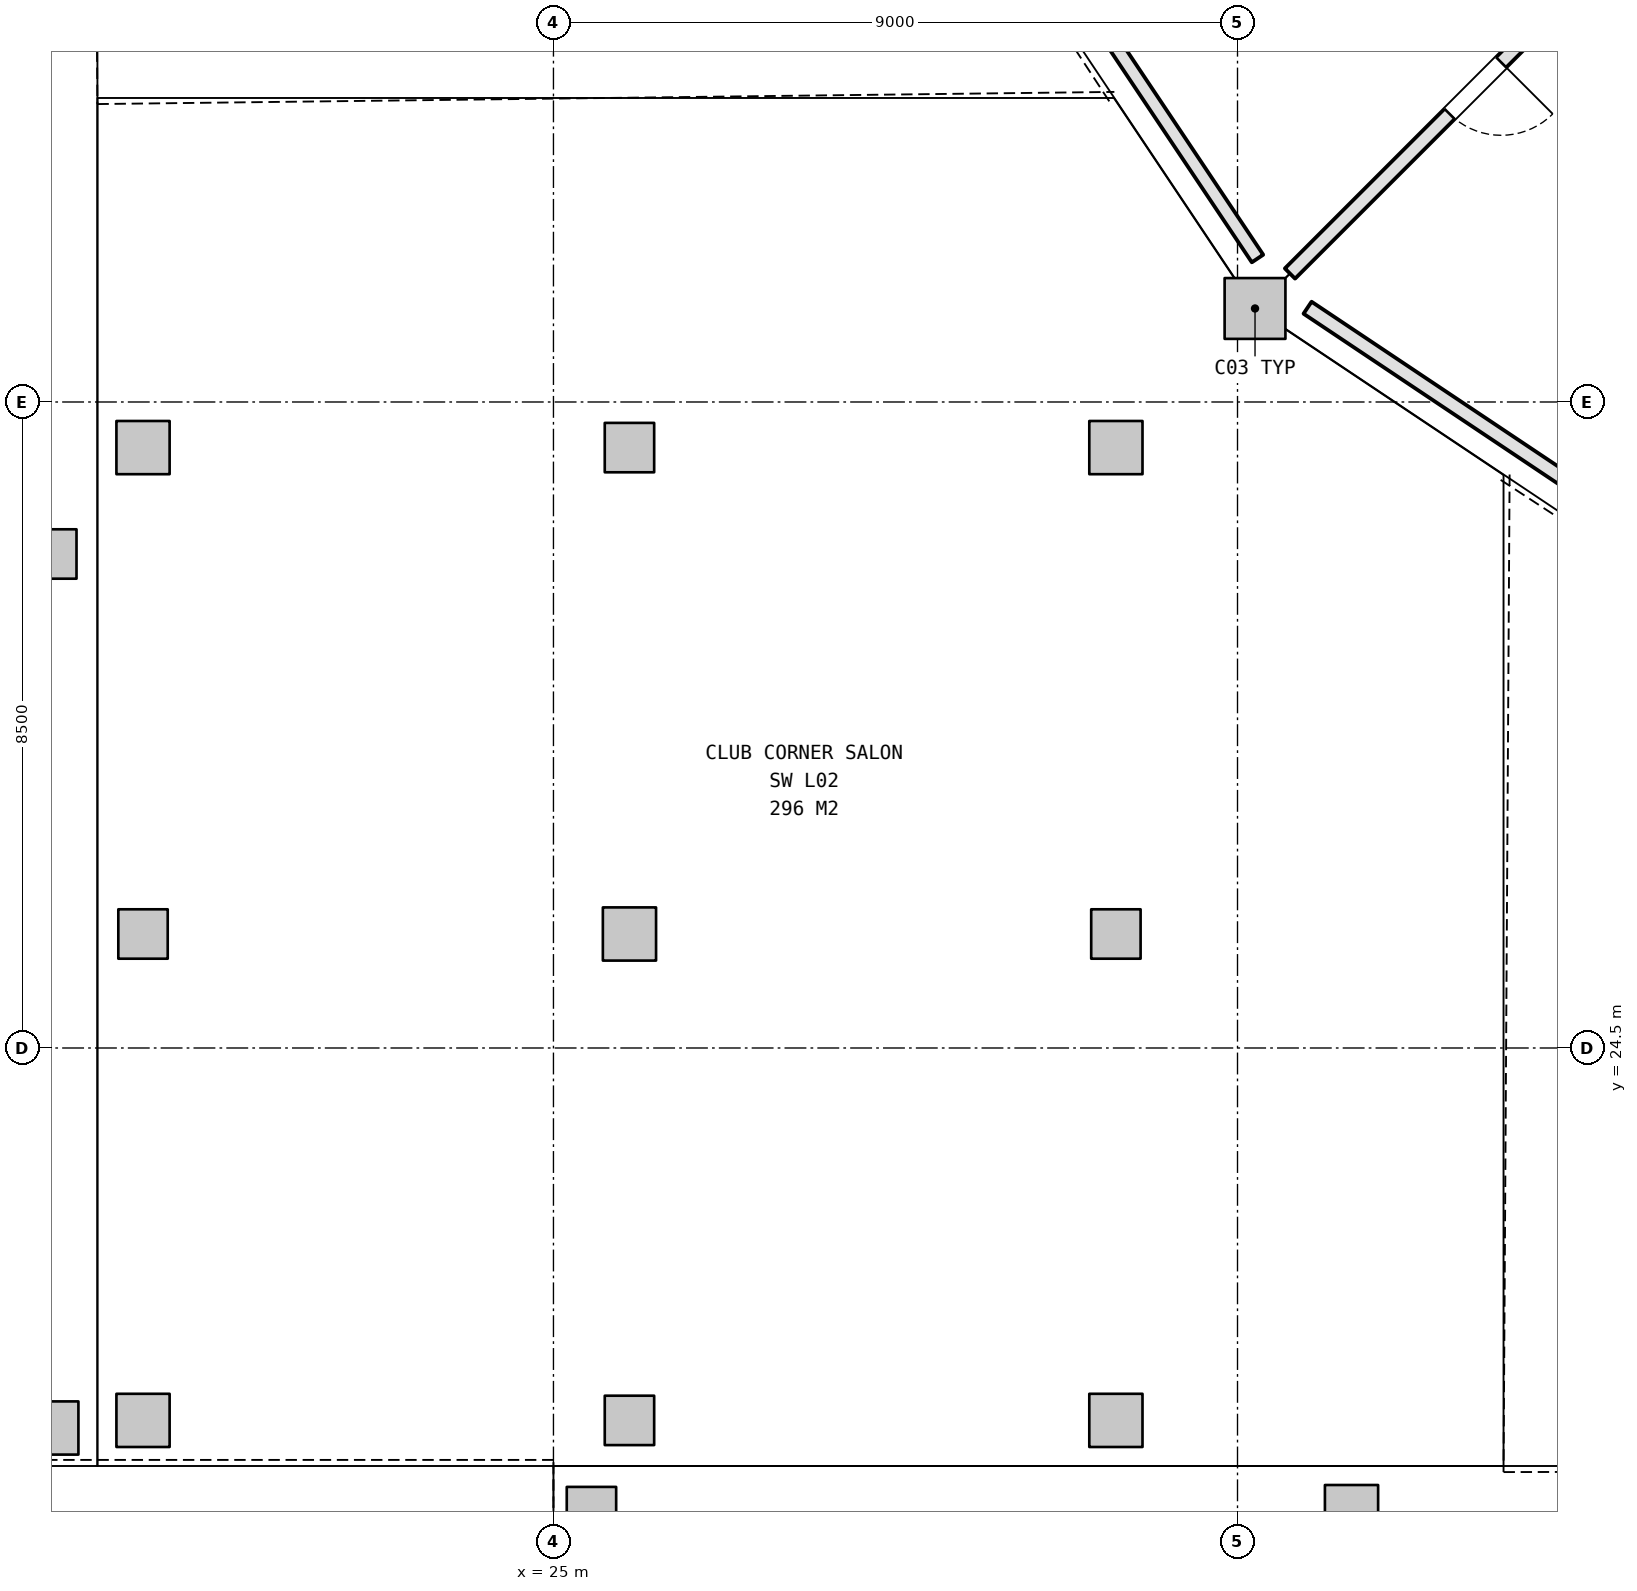
"""IFC4 building model, lengths in metres.
Left out: names, types, materials, properties, quantities, classifications, styles, units other than length and angle.
Written with IfcOpenShell. Run it as: python <this file> out.ifc"""

import sys

from ifc_helpers import new_model, si_unit, direction, frame, frame_2d, origin, origin_2d, place, context, subcontext, project, spatial, rectangle, extrude, element, fill, save


model = new_model("IFC4")
c1 = context("Model", 3, precision=1e-05, world=origin(), true_north=direction((0.0, 1.0)))
c2 = subcontext(c1, "Body", "Model", "MODEL_VIEW")
j1 = project(units=[si_unit("LENGTHUNIT", "METRE"), si_unit("PLANEANGLEUNIT", "RADIAN")], contexts=[c1])
p1 = place(None, origin())
s1 = spatial("IfcSite", under=j1, at=p1, CompositionType="ELEMENT")
p2 = place(p1, origin())
s2 = spatial("IfcBuilding", under=s1, at=p2, CompositionType="ELEMENT")
p3 = place(p2, frame((0.0, 0.0, 10.8)))
s3 = spatial("IfcBuildingStorey", under=s2, at=p3, CompositionType="ELEMENT", Elevation=10.8)
p4 = place(p3, frame((34.23, 34.23, 0.0), z_axis=(0.0, 0.0, 1.0), x_axis=(1.0, 0.0, 0.0)))
e1 = element("IfcColumn", 1, at=p4, inside=s3, PredefinedType="COLUMN", context=c2, shape_type="SweptSolid", body=[
    extrude(rectangle(XDim=0.8, YDim=0.8, at=origin_2d()), origin(), (0.0, 0.0, 1.0), 5.4),
])
p5 = place(p3, frame((18.4, 19.5, 0.0), z_axis=(0.0, 0.0, 1.0), x_axis=(1.0, 0.0, 0.0)))
e2 = element("IfcColumn", 2, at=p5, inside=s3, PredefinedType="COLUMN", context=c2, shape_type="SweptSolid", body=[
    extrude(rectangle(XDim=0.7, YDim=0.7, at=origin_2d()), origin(), (0.0, 0.0, 1.0), 5.4),
])
for number, where, z_axis, x_axis in (
    (3, (18.4, 31.0, 0.0), (0.0, 0.0, 1.0), (1.0, 0.0, 0.0)),
    (4, (25.5, 18.4, 0.0), (0.0, 0.0, 1.0), (1.0, 0.0, 0.0)),
):
    element("IfcColumn", number, at=place(p3, frame(where, z_axis=z_axis, x_axis=x_axis)), inside=s3, PredefinedType="COLUMN", context=c2, shape_type="SweptSolid", body=[
        extrude(rectangle(XDim=0.65, YDim=0.65, at=origin_2d()), origin(), (0.0, 0.0, 1.0), 5.4),
    ])
for number, where, z_axis, x_axis in (
    (5, (35.5, 18.4, 0.0), (0.0, 0.0, 1.0), (1.0, 0.0, 0.0)),
    (6, (19.6, 19.6, 0.0), (0.0, 0.0, 1.0), (1.0, 0.0, 0.0)),
):
    element("IfcColumn", number, at=place(p3, frame(where, z_axis=z_axis, x_axis=x_axis)), inside=s3, PredefinedType="COLUMN", context=c2, shape_type="SweptSolid", body=[
        extrude(rectangle(XDim=0.7, YDim=0.7, at=origin_2d()), origin(), (0.0, 0.0, 1.0), 5.4),
    ])
p6 = place(p3, frame((19.6, 26.0, 0.0), z_axis=(0.0, 0.0, 1.0), x_axis=(1.0, 0.0, 0.0)))
e7 = element("IfcColumn", 7, at=p6, inside=s3, PredefinedType="COLUMN", context=c2, shape_type="SweptSolid", body=[
    extrude(rectangle(XDim=0.65, YDim=0.65, at=origin_2d()), origin(), (0.0, 0.0, 1.0), 5.4),
])
p7 = place(p3, frame((19.6, 32.4, 0.0), z_axis=(0.0, 0.0, 1.0), x_axis=(1.0, 0.0, 0.0)))
e8 = element("IfcColumn", 8, at=p7, inside=s3, PredefinedType="COLUMN", context=c2, shape_type="SweptSolid", body=[
    extrude(rectangle(XDim=0.7, YDim=0.7, at=origin_2d()), origin(), (0.0, 0.0, 1.0), 5.4),
])
p8 = place(p3, frame((26.0, 19.6, 0.0), z_axis=(0.0, 0.0, 1.0), x_axis=(1.0, 0.0, 0.0)))
e9 = element("IfcColumn", 9, at=p8, inside=s3, PredefinedType="COLUMN", context=c2, shape_type="SweptSolid", body=[
    extrude(rectangle(XDim=0.65, YDim=0.65, at=origin_2d()), origin(), (0.0, 0.0, 1.0), 5.4),
])
p9 = place(p3, frame((26.0, 26.0, 0.0), z_axis=(0.0, 0.0, 1.0), x_axis=(1.0, 0.0, 0.0)))
e10 = element("IfcColumn", 10, at=p9, inside=s3, PredefinedType="COLUMN", context=c2, shape_type="SweptSolid", body=[
    extrude(rectangle(XDim=0.7, YDim=0.7, at=origin_2d()), origin(), (0.0, 0.0, 1.0), 5.4),
])
p10 = place(p3, frame((26.0, 32.4, 0.0), z_axis=(0.0, 0.0, 1.0), x_axis=(1.0, 0.0, 0.0)))
e11 = element("IfcColumn", 11, at=p10, inside=s3, PredefinedType="COLUMN", context=c2, shape_type="SweptSolid", body=[
    extrude(rectangle(XDim=0.65, YDim=0.65, at=origin_2d()), origin(), (0.0, 0.0, 1.0), 5.4),
])
p11 = place(p3, frame((32.4, 19.6, 0.0), z_axis=(0.0, 0.0, 1.0), x_axis=(1.0, 0.0, 0.0)))
e12 = element("IfcColumn", 12, at=p11, inside=s3, PredefinedType="COLUMN", context=c2, shape_type="SweptSolid", body=[
    extrude(rectangle(XDim=0.7, YDim=0.7, at=origin_2d()), origin(), (0.0, 0.0, 1.0), 5.4),
])
p12 = place(p3, frame((32.4, 26.0, 0.0), z_axis=(0.0, 0.0, 1.0), x_axis=(1.0, 0.0, 0.0)))
e13 = element("IfcColumn", 13, at=p12, inside=s3, PredefinedType="COLUMN", context=c2, shape_type="SweptSolid", body=[
    extrude(rectangle(XDim=0.65, YDim=0.65, at=origin_2d()), origin(), (0.0, 0.0, 1.0), 5.4),
])
p13 = place(p3, frame((32.4, 32.4, 0.0), z_axis=(0.0, 0.0, 1.0), x_axis=(1.0, 0.0, 0.0)))
e14 = element("IfcColumn", 14, at=p13, inside=s3, PredefinedType="COLUMN", context=c2, shape_type="SweptSolid", body=[
    extrude(rectangle(XDim=0.7, YDim=0.7, at=origin_2d()), origin(), (0.0, 0.0, 1.0), 5.4),
])
p14 = place(p3, frame((39.569, 39.569, 0.0), z_axis=(0.0, 0.0, 1.0), x_axis=(-0.707106781187, -0.707106781187, 0.0)))
e15 = element("IfcWall", 15, at=p14, inside=s3, PredefinedType="PARTITIONING", context=c2, shape_type="SweptSolid", body=[
    extrude(rectangle(XDim=6.9, YDim=0.19, at=frame_2d((3.45, 0.0))), origin(), (0.0, 0.0, 1.0), 4.255),
])
p15 = place(p14, frame((2.97, 0.0, 0.0)))
e16 = element("IfcOpeningElement", 16, at=p15, cuts=e15, PredefinedType="OPENING", context=c2, shape_type="SweptSolid", body=[
    extrude(rectangle(XDim=0.96, YDim=2.15, at=frame_2d((0.48, 1.075))), frame((0.0, 0.105, 0.0), z_axis=(0.0, -1.0, 0.0), x_axis=(1.0, 0.0, 0.0)), (0.0, 0.0, 1.0), 0.21),
])
p16 = place(p3, frame((34.263, 34.887, 0.0), z_axis=(0.0, 0.0, 1.0), x_axis=(-0.555562946988, 0.831474480627, 0.0)))
e17 = element("IfcWall", 17, at=p16, inside=s3, PredefinedType="PARTITIONING", context=c2, shape_type="SweptSolid", body=[
    extrude(rectangle(XDim=19.192, YDim=0.18, at=frame_2d((9.596, 0.0))), origin(), (0.0, 0.0, 1.0), 5.12),
])
p17 = place(p3, frame((50.879, 23.578, 0.0), z_axis=(0.0, 0.0, 1.0), x_axis=(-0.831474480627, 0.555562946988, 0.0)))
e18 = element("IfcWall", 18, at=p17, inside=s3, PredefinedType="PARTITIONING", context=c2, shape_type="SweptSolid", body=[
    extrude(rectangle(XDim=19.192, YDim=0.19, at=frame_2d((9.596, 0.0))), origin(), (0.0, 0.0, 1.0), 5.12),
])
p18 = place(p15, origin())
e19 = element("IfcDoor", 19, at=p18, inside=s3, OperationType="SINGLE_SWING_LEFT", PredefinedType="DOOR", context=c2, shape_type="SweptSolid", body=[
    extrude(rectangle(XDim=0.96, YDim=2.15, at=frame_2d((0.48, 1.075))), frame((0.0, 0.025, 0.0), z_axis=(0.0, -1.0, 0.0), x_axis=(1.0, 0.0, 0.0)), (0.0, 0.0, 1.0), 0.05),
])
fill(e16, e19)
save(model, sys.argv[1])
